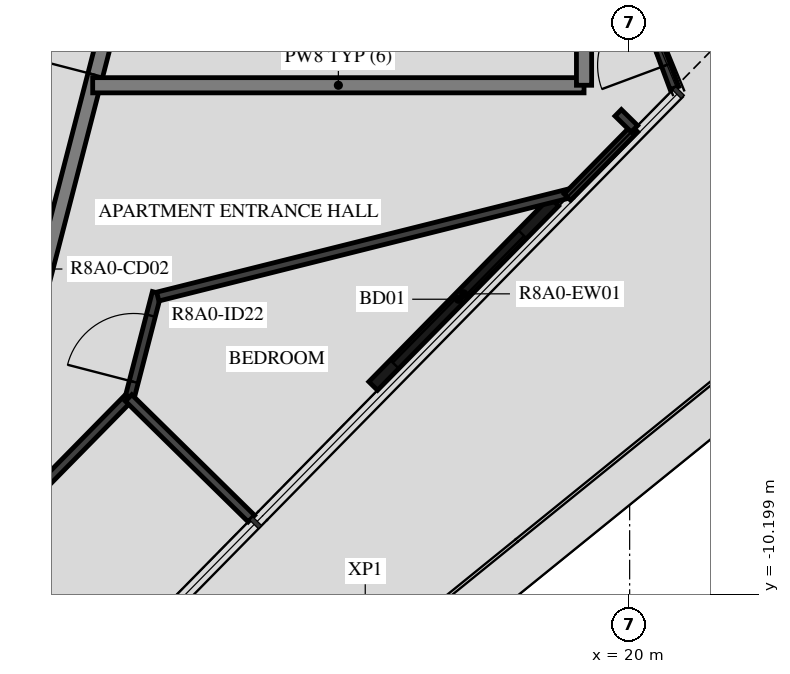
"""IFC4 building model, lengths in metres.
Left out: names, types, materials, properties, quantities, classifications, styles, units other than length and angle.
Written with IfcOpenShell. Run it as: python <this file> out.ifc"""

import sys

from ifc_helpers import new_model, si_unit, direction, frame, frame_2d, origin, place, context, subcontext, project, spatial, rectangle, extrude, element, fill, save


model = new_model("IFC4")
c1 = context("Model", 3, precision=1e-05, world=origin(), true_north=direction((0.0, 1.0)))
c2 = subcontext(c1, "Body", "Model", "MODEL_VIEW")
j1 = project(units=[si_unit("LENGTHUNIT", "METRE"), si_unit("PLANEANGLEUNIT", "RADIAN")], contexts=[c1])
p1 = place(None, origin())
s1 = spatial("IfcSite", under=j1, at=p1, CompositionType="ELEMENT")
p2 = place(p1, origin())
s2 = spatial("IfcBuilding", under=s1, at=p2, CompositionType="ELEMENT")
p3 = place(p2, frame((0.0, 0.0, 298.2)))
s3 = spatial("IfcBuildingStorey", under=s2, at=p3, CompositionType="ELEMENT", Elevation=298.2)
p4 = place(p3, frame((16.626, -7.456, 0.0), z_axis=(0.0, 0.0, 1.0), x_axis=(0.700902547194, 0.713257049973, 0.0)))
e1 = element("IfcWall", 1, at=p4, inside=s3, PredefinedType="STANDARD", context=c2, shape_type="SweptSolid", body=[
    extrude(rectangle(XDim=3.399, YDim=0.16, at=frame_2d((1.699, 0.0))), origin(), (0.0, 0.0, 1.0), 3.12),
])
p5 = place(p4, frame((0.4, 0.0, 0.0)))
e2 = element("IfcOpeningElement", 2, at=p5, cuts=e1, PredefinedType="OPENING", context=c2, shape_type="SweptSolid", body=[
    extrude(rectangle(XDim=2.4, YDim=2.4, at=frame_2d((1.2, 1.2))), frame((0.0, 0.09, 0.0), z_axis=(0.0, -1.0, 0.0), x_axis=(1.0, 0.0, 0.0)), (0.0, 0.0, 1.0), 0.18),
])
p6 = place(p3, frame((12.074, -6.831, 0.0), z_axis=(0.0, 0.0, 1.0), x_axis=(0.250391063186, 0.968144780225, 0.0)))
e3 = element("IfcWall", 3, at=p6, inside=s3, PredefinedType="STANDARD", context=c2, shape_type="SweptSolid", body=[
    extrude(rectangle(XDim=7.181, YDim=0.2, at=frame_2d((3.591, 0.0))), origin(), (0.0, 0.0, 1.0), 3.12),
])
p7 = place(p6, frame((3.581, 0.0, 0.0)))
e4 = element("IfcOpeningElement", 4, at=p7, cuts=e3, PredefinedType="OPENING", context=c2, shape_type="SweptSolid", body=[
    extrude(rectangle(XDim=1.8, YDim=2.1, at=frame_2d((0.9, 1.05))), frame((0.0, 0.11, 0.0), z_axis=(0.0, -1.0, 0.0), x_axis=(1.0, 0.0, 0.0)), (0.0, 0.0, 1.0), 0.22),
])
p8 = place(p3, frame((12.936, -3.5, 0.0), z_axis=(0.0, 0.0, 1.0), x_axis=(1.0, 0.0, 0.0)))
e5 = element("IfcWall", 5, at=p8, inside=s3, PredefinedType="STANDARD", context=c2, shape_type="SweptSolid", body=[
    extrude(rectangle(XDim=6.464, YDim=0.2, at=frame_2d((3.232, 0.0))), origin(), (0.0, 0.0, 1.0), 3.12),
])
p9 = place(p3, frame((19.4, -3.5, 0.0), z_axis=(0.0, 0.0, 1.0), x_axis=(0.0, 1.0, 0.0)))
e6 = element("IfcWall", 6, at=p9, inside=s3, PredefinedType="STANDARD", context=c2, shape_type="SweptSolid", body=[
    extrude(rectangle(XDim=3.889, YDim=0.2, at=frame_2d((1.944, 0.0))), origin(), (0.0, 0.0, 1.0), 3.12),
])
p10 = place(p3, frame((7.846, -13.273, 0.0), z_axis=(0.0, 0.0, 1.0), x_axis=(0.700911018066, 0.713248725728, 0.0)))
e7 = element("IfcWall", 7, at=p10, inside=s3, PredefinedType="PARTITIONING", context=c2, shape_type="SweptSolid", body=[
    extrude(rectangle(XDim=7.935, YDim=0.12, at=frame_2d((3.968, 0.0))), origin(), (0.0, 0.0, 1.0), 3.12),
])
p11 = place(p10, frame((0.2, 0.0, 0.0)))
e8 = element("IfcOpeningElement", 8, at=p11, cuts=e7, PredefinedType="OPENING", context=c2, shape_type="SweptSolid", body=[
    extrude(rectangle(XDim=0.9, YDim=2.1, at=frame_2d((0.45, 1.05))), frame((0.0, 0.07, 0.0), z_axis=(0.0, -1.0, 0.0), x_axis=(1.0, 0.0, 0.0)), (0.0, 0.0, 1.0), 0.14),
])
p12 = place(p3, frame((13.426, -7.596, 0.0), z_axis=(0.0, 0.0, 1.0), x_axis=(0.250380027586, 0.968147634292, 0.0)))
e9 = element("IfcWall", 9, at=p12, inside=s3, PredefinedType="PARTITIONING", context=c2, shape_type="SweptSolid", body=[
    extrude(rectangle(XDim=1.412, YDim=0.12, at=frame_2d((0.706, 0.0))), origin(), (0.0, 0.0, 1.0), 3.12),
])
p13 = place(p12, frame((0.2, 0.0, 0.0)))
e10 = element("IfcOpeningElement", 10, at=p13, cuts=e9, PredefinedType="OPENING", context=c2, shape_type="SweptSolid", body=[
    extrude(rectangle(XDim=0.9, YDim=2.1, at=frame_2d((0.45, 1.05))), frame((0.0, 0.07, 0.0), z_axis=(0.0, -1.0, 0.0), x_axis=(1.0, 0.0, 0.0)), (0.0, 0.0, 1.0), 0.14),
])
p14 = place(p3, frame((13.792, -6.28, 0.0), z_axis=(0.0, 0.0, 1.0), x_axis=(0.970009253073, 0.243067992449, 0.0)))
e11 = element("IfcWall", 11, at=p14, inside=s3, PredefinedType="PARTITIONING", context=c2, shape_type="SweptSolid", body=[
    extrude(rectangle(XDim=5.611, YDim=0.12, at=frame_2d((2.805, 0.0))), origin(), (0.0, 0.0, 1.0), 3.12),
])
p15 = place(p3, frame((19.18, -4.971, 0.0), z_axis=(0.0, 0.0, 1.0), x_axis=(0.700974030867, 0.713186797445, 0.0)))
e12 = element("IfcWall", 12, at=p15, inside=s3, PredefinedType="PARTITIONING", context=c2, shape_type="SweptSolid", body=[
    extrude(rectangle(XDim=1.26, YDim=0.12, at=frame_2d((0.63, 0.0))), origin(), (0.0, 0.0, 1.0), 3.12),
])
p16 = place(p3, frame((20.59, -3.537, 0.0), z_axis=(0.0, 0.0, 1.0), x_axis=(-0.348621180513, 0.937263715556, 0.0)))
e13 = element("IfcWall", 13, at=p16, inside=s3, PredefinedType="PARTITIONING", context=c2, shape_type="SweptSolid", body=[
    extrude(rectangle(XDim=3.413, YDim=0.12, at=frame_2d((1.706, 0.0))), origin(), (0.0, 0.0, 1.0), 3.12),
])
p17 = place(p16, frame((0.32, 0.0, 0.0)))
e14 = element("IfcOpeningElement", 14, at=p17, cuts=e13, PredefinedType="OPENING", context=c2, shape_type="SweptSolid", body=[
    extrude(rectangle(XDim=0.9, YDim=2.1, at=frame_2d((0.45, 1.05))), frame((0.0, 0.07, 0.0), z_axis=(0.0, -1.0, 0.0), x_axis=(1.0, 0.0, 0.0)), (0.0, 0.0, 1.0), 0.14),
])
p18 = place(p3, frame((15.024, -9.201, 0.0), z_axis=(0.0, 0.0, 1.0), x_axis=(-0.713331704042, 0.700826569137, 0.0)))
e15 = element("IfcWall", 15, at=p18, inside=s3, PredefinedType="PARTITIONING", context=c2, shape_type="SweptSolid", body=[
    extrude(rectangle(XDim=2.265, YDim=0.12, at=frame_2d((1.132, 0.0))), origin(), (0.0, 0.0, 1.0), 2.73),
])
p19 = place(p3, frame((20.063, -4.073, 0.0), z_axis=(0.0, 0.0, 1.0), x_axis=(-0.7135861572, 0.700567481584, 0.0)))
e16 = element("IfcWall", 16, at=p19, inside=s3, PredefinedType="PARTITIONING", context=c2, shape_type="SweptSolid", body=[
    extrude(rectangle(XDim=0.3, YDim=0.12, at=frame_2d((0.15, 0.0))), origin(), (0.0, 0.0, 1.0), 3.12),
])
p20 = place(p5, origin())
e17 = element("IfcDoor", 17, at=p20, inside=s3, OperationType="DOUBLE_DOOR_SLIDING", PredefinedType="DOOR", context=c2, shape_type="SweptSolid", body=[
    extrude(rectangle(XDim=2.4, YDim=2.4, at=frame_2d((1.2, 1.2))), frame((0.0, 0.025, 0.0), z_axis=(0.0, -1.0, 0.0), x_axis=(1.0, 0.0, 0.0)), (0.0, 0.0, 1.0), 0.05),
])
fill(e2, e17)
p21 = place(p13, origin())
e18 = element("IfcDoor", 18, at=p21, inside=s3, OperationType="SINGLE_SWING_RIGHT", PredefinedType="DOOR", context=c2, shape_type="SweptSolid", body=[
    extrude(rectangle(XDim=0.9, YDim=2.1, at=frame_2d((0.45, 1.05))), frame((0.0, 0.025, 0.0), z_axis=(0.0, -1.0, 0.0), x_axis=(1.0, 0.0, 0.0)), (0.0, 0.0, 1.0), 0.05),
])
fill(e10, e18)
p22 = place(p17, origin())
e19 = element("IfcDoor", 19, at=p22, inside=s3, OperationType="SINGLE_SWING_RIGHT", PredefinedType="DOOR", context=c2, shape_type="SweptSolid", body=[
    extrude(rectangle(XDim=0.9, YDim=2.1, at=frame_2d((0.45, 1.05))), frame((0.0, 0.025, 0.0), z_axis=(0.0, -1.0, 0.0), x_axis=(1.0, 0.0, 0.0)), (0.0, 0.0, 1.0), 0.05),
])
fill(e14, e19)
p23 = place(p7, origin())
e20 = element("IfcDoor", 20, at=p23, inside=s3, OperationType="DOUBLE_DOOR_SINGLE_SWING", PredefinedType="DOOR", context=c2, shape_type="SweptSolid", body=[
    extrude(rectangle(XDim=1.8, YDim=2.1, at=frame_2d((0.9, 1.05))), frame((0.0, 0.025, 0.0), z_axis=(0.0, -1.0, 0.0), x_axis=(1.0, 0.0, 0.0)), (0.0, 0.0, 1.0), 0.05),
])
fill(e4, e20)
save(model, sys.argv[1])
